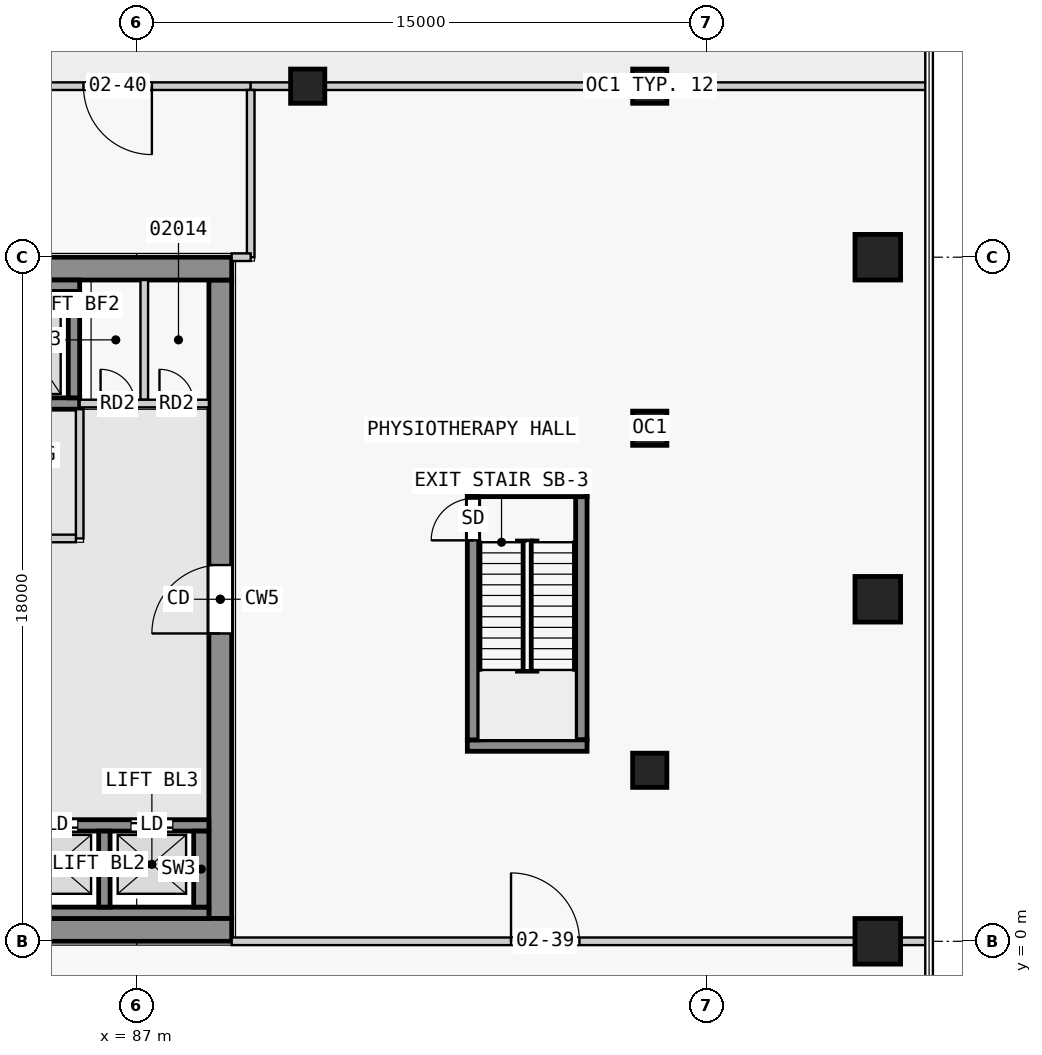
"""IFC4 building model, lengths in metres.
Left out: names, types, materials, properties, quantities, classifications, styles, units other than length and angle.
Written with IfcOpenShell. Run it as: python <this file> out.ifc"""

import sys

from ifc_helpers import new_model, si_unit, direction, frame, frame_2d, origin, origin_2d, place, context, subcontext, project, spatial, rectangle, extrude, element, fill, save


model = new_model("IFC4")
c1 = context("Model", 3, precision=1e-05, world=origin(), true_north=direction((0.0, 1.0)))
c2 = subcontext(c1, "Body", "Model", "MODEL_VIEW")
j1 = project(units=[si_unit("LENGTHUNIT", "METRE"), si_unit("PLANEANGLEUNIT", "RADIAN")], contexts=[c1])
p1 = place(None, origin())
s1 = spatial("IfcSite", under=j1, at=p1, CompositionType="ELEMENT")
p2 = place(p1, origin())
s2 = spatial("IfcBuilding", under=s1, at=p2, CompositionType="ELEMENT")
p3 = place(p2, frame((0.0, 0.0, 12.8)))
s3 = spatial("IfcBuildingStorey", under=s2, at=p3, CompositionType="ELEMENT", Elevation=12.8)
for number, where, z_axis, x_axis in (
    (1, (106.5, 0.0, 0.0), (0.0, 0.0, 1.0), (1.0, 0.0, 0.0)),
    (2, (106.5, 9.0, 0.0), (0.0, 0.0, 1.0), (1.0, 0.0, 0.0)),
    (3, (106.5, 18.0, 0.0), (0.0, 0.0, 1.0), (1.0, 0.0, 0.0)),
):
    element("IfcColumn", number, at=place(p3, frame(where, z_axis=z_axis, x_axis=x_axis)), inside=s3, PredefinedType="COLUMN", context=c2, shape_type="SweptSolid", body=[
        extrude(rectangle(XDim=1.2, YDim=1.2, at=origin_2d()), origin(), (0.0, 0.0, 1.0), 4.5),
    ])
for number, where, z_axis, x_axis in (
    (4, (100.5, 4.5, 0.0), (0.0, 0.0, 1.0), (1.0, 0.0, 0.0)),
    (5, (100.5, 13.5, 0.0), (0.0, 0.0, 1.0), (1.0, 0.0, 0.0)),
    (6, (100.5, 22.5, 0.0), (0.0, 0.0, 1.0), (1.0, 0.0, 0.0)),
    (7, (91.5, 22.5, 0.0), (0.0, 0.0, 1.0), (1.0, 0.0, 0.0)),
):
    element("IfcColumn", number, at=place(p3, frame(where, z_axis=z_axis, x_axis=x_axis)), inside=s3, PredefinedType="COLUMN", context=c2, shape_type="SweptSolid", body=[
        extrude(rectangle(XDim=0.9, YDim=0.9, at=origin_2d()), origin(), (0.0, 0.0, 1.0), 4.5),
    ])
for number, where, z_axis, x_axis in (
    (8, (75.0, 0.3, 0.0), (0.0, 0.0, 1.0), (1.0, 0.0, 0.0)),
    (9, (75.0, 17.7, 0.0), (0.0, 0.0, 1.0), (1.0, 0.0, 0.0)),
):
    element("IfcWall", number, at=place(p3, frame(where, z_axis=z_axis, x_axis=x_axis)), inside=s3, PredefinedType="SHEAR", context=c2, shape_type="SweptSolid", body=[
        extrude(rectangle(XDim=14.5, YDim=0.6, at=frame_2d((7.25, 0.0))), origin(), (0.0, 0.0, 1.0), 4.15),
    ])
p4 = place(p3, frame((89.2, 0.6, 0.0), z_axis=(0.0, 0.0, 1.0), x_axis=(0.0, 1.0, 0.0)))
e10 = element("IfcWall", 10, at=p4, inside=s3, PredefinedType="SHEAR", context=c2, shape_type="SweptSolid", body=[
    extrude(rectangle(XDim=16.8, YDim=0.6, at=frame_2d((8.4, 0.0))), origin(), (0.0, 0.0, 1.0), 4.15),
])
p5 = place(p4, frame((7.5, 0.0, 0.0)))
e11 = element("IfcOpeningElement", 11, at=p5, cuts=e10, PredefinedType="OPENING", context=c2, shape_type="SweptSolid", body=[
    extrude(rectangle(XDim=1.8, YDim=2.1, at=frame_2d((0.9, 1.05))), frame((0.0, 0.31, 0.0), z_axis=(0.0, -1.0, 0.0), x_axis=(1.0, 0.0, 0.0)), (0.0, 0.0, 1.0), 0.62),
])
p6 = place(p3, frame((81.3, 0.75, 0.0), z_axis=(0.0, 0.0, 1.0), x_axis=(1.0, 0.0, 0.0)))
e12 = element("IfcWall", 12, at=p6, inside=s3, PredefinedType="SHEAR", context=c2, shape_type="SweptSolid", body=[
    extrude(rectangle(XDim=7.6, YDim=0.3, at=frame_2d((3.8, 0.0))), origin(), (0.0, 0.0, 1.0), 4.15),
])
p7 = place(p3, frame((86.15, 0.9, 0.0), z_axis=(0.0, 0.0, 1.0), x_axis=(0.0, 1.0, 0.0)))
e13 = element("IfcWall", 13, at=p7, inside=s3, PredefinedType="SHEAR", context=c2, shape_type="SweptSolid", body=[
    extrude(rectangle(XDim=2.0, YDim=0.3, at=frame_2d((1.0, 0.0))), origin(), (0.0, 0.0, 1.0), 4.15),
])
p8 = place(p3, frame((88.7, 0.9, 0.0), z_axis=(0.0, 0.0, 1.0), x_axis=(0.0, 1.0, 0.0)))
e14 = element("IfcWall", 14, at=p8, inside=s3, PredefinedType="SHEAR", context=c2, shape_type="SweptSolid", body=[
    extrude(rectangle(XDim=2.0, YDim=0.4, at=frame_2d((1.0, 0.0))), origin(), (0.0, 0.0, 1.0), 4.15),
])
p9 = place(p3, frame((81.3, 3.05, 0.0), z_axis=(0.0, 0.0, 1.0), x_axis=(1.0, 0.0, 0.0)))
e15 = element("IfcWall", 15, at=p9, inside=s3, PredefinedType="SHEAR", context=c2, shape_type="SweptSolid", body=[
    extrude(rectangle(XDim=7.6, YDim=0.3, at=frame_2d((3.8, 0.0))), origin(), (0.0, 0.0, 1.0), 4.15),
])
p10 = place(p9, frame((0.55, 0.0, 0.0)))
e16 = element("IfcOpeningElement", 16, at=p10, cuts=e15, PredefinedType="OPENING", context=c2, shape_type="SweptSolid", body=[
    extrude(rectangle(XDim=1.1, YDim=2.1, at=frame_2d((0.55, 1.05))), frame((0.0, 0.16, 0.0), z_axis=(0.0, -1.0, 0.0), x_axis=(1.0, 0.0, 0.0)), (0.0, 0.0, 1.0), 0.32),
])
p11 = place(p9, frame((3.05, 0.0, 0.0)))
e17 = element("IfcOpeningElement", 17, at=p11, cuts=e15, PredefinedType="OPENING", context=c2, shape_type="SweptSolid", body=[
    extrude(rectangle(XDim=1.1, YDim=2.1, at=frame_2d((0.55, 1.05))), frame((0.0, 0.16, 0.0), z_axis=(0.0, -1.0, 0.0), x_axis=(1.0, 0.0, 0.0)), (0.0, 0.0, 1.0), 0.32),
])
p12 = place(p9, frame((5.55, 0.0, 0.0)))
e18 = element("IfcOpeningElement", 18, at=p12, cuts=e15, PredefinedType="OPENING", context=c2, shape_type="SweptSolid", body=[
    extrude(rectangle(XDim=1.1, YDim=2.1, at=frame_2d((0.55, 1.05))), frame((0.0, 0.16, 0.0), z_axis=(0.0, -1.0, 0.0), x_axis=(1.0, 0.0, 0.0)), (0.0, 0.0, 1.0), 0.32),
])
p13 = place(p3, frame((75.6, 17.25, 0.0), z_axis=(0.0, 0.0, 1.0), x_axis=(1.0, 0.0, 0.0)))
e19 = element("IfcWall", 19, at=p13, inside=s3, PredefinedType="SHEAR", context=c2, shape_type="SweptSolid", body=[
    extrude(rectangle(XDim=9.9, YDim=0.3, at=frame_2d((4.95, 0.0))), origin(), (0.0, 0.0, 1.0), 4.15),
])
p14 = place(p3, frame((75.6, 14.15, 0.0), z_axis=(0.0, 0.0, 1.0), x_axis=(1.0, 0.0, 0.0)))
e20 = element("IfcWall", 20, at=p14, inside=s3, PredefinedType="SHEAR", context=c2, shape_type="SweptSolid", body=[
    extrude(rectangle(XDim=9.9, YDim=0.3, at=frame_2d((4.95, 0.0))), origin(), (0.0, 0.0, 1.0), 4.15),
])
p15 = place(p14, frame((0.85, 0.0, 0.0)))
e21 = element("IfcOpeningElement", 21, at=p15, cuts=e20, PredefinedType="OPENING", context=c2, shape_type="SweptSolid", body=[
    extrude(rectangle(XDim=1.1, YDim=2.1, at=frame_2d((0.55, 1.05))), frame((0.0, 0.16, 0.0), z_axis=(0.0, -1.0, 0.0), x_axis=(1.0, 0.0, 0.0)), (0.0, 0.0, 1.0), 0.32),
])
p16 = place(p14, frame((3.35, 0.0, 0.0)))
e22 = element("IfcOpeningElement", 22, at=p16, cuts=e20, PredefinedType="OPENING", context=c2, shape_type="SweptSolid", body=[
    extrude(rectangle(XDim=1.1, YDim=2.1, at=frame_2d((0.55, 1.05))), frame((0.0, 0.16, 0.0), z_axis=(0.0, -1.0, 0.0), x_axis=(1.0, 0.0, 0.0)), (0.0, 0.0, 1.0), 0.32),
])
p17 = place(p14, frame((5.75, 0.0, 0.0)))
e23 = element("IfcOpeningElement", 23, at=p17, cuts=e20, PredefinedType="OPENING", context=c2, shape_type="SweptSolid", body=[
    extrude(rectangle(XDim=1.1, YDim=2.1, at=frame_2d((0.55, 1.05))), frame((0.0, 0.16, 0.0), z_axis=(0.0, -1.0, 0.0), x_axis=(1.0, 0.0, 0.0)), (0.0, 0.0, 1.0), 0.32),
])
p18 = place(p14, frame((8.05, 0.0, 0.0)))
e24 = element("IfcOpeningElement", 24, at=p18, cuts=e20, PredefinedType="OPENING", context=c2, shape_type="SweptSolid", body=[
    extrude(rectangle(XDim=1.1, YDim=2.1, at=frame_2d((0.55, 1.05))), frame((0.0, 0.16, 0.0), z_axis=(0.0, -1.0, 0.0), x_axis=(1.0, 0.0, 0.0)), (0.0, 0.0, 1.0), 0.32),
])
p19 = place(p3, frame((85.35, 14.3, 0.0), z_axis=(0.0, 0.0, 1.0), x_axis=(0.0, 1.0, 0.0)))
e25 = element("IfcWall", 25, at=p19, inside=s3, PredefinedType="SHEAR", context=c2, shape_type="SweptSolid", body=[
    extrude(rectangle(XDim=2.8, YDim=0.3, at=frame_2d((1.4, 0.0))), origin(), (0.0, 0.0, 1.0), 4.15),
])
p20 = place(p3, frame((95.85, 5.3, 0.0), z_axis=(0.0, 0.0, 1.0), x_axis=(0.0, 1.0, 0.0)))
e26 = element("IfcWall", 26, at=p20, inside=s3, PredefinedType="SHEAR", context=c2, shape_type="SweptSolid", body=[
    extrude(rectangle(XDim=6.4, YDim=0.3, at=frame_2d((3.2, 0.0))), origin(), (0.0, 0.0, 1.0), 4.15),
])
p21 = place(p20, frame((5.25, 0.0, 0.0)))
e27 = element("IfcOpeningElement", 27, at=p21, cuts=e26, PredefinedType="OPENING", context=c2, shape_type="SweptSolid", body=[
    extrude(rectangle(XDim=1.1, YDim=2.1, at=frame_2d((0.55, 1.05))), frame((0.0, 0.16, 0.0), z_axis=(0.0, -1.0, 0.0), x_axis=(1.0, 0.0, 0.0)), (0.0, 0.0, 1.0), 0.32),
])
p22 = place(p3, frame((98.7, 5.3, 0.0), z_axis=(0.0, 0.0, 1.0), x_axis=(0.0, 1.0, 0.0)))
e28 = element("IfcWall", 28, at=p22, inside=s3, PredefinedType="SHEAR", context=c2, shape_type="SweptSolid", body=[
    extrude(rectangle(XDim=6.4, YDim=0.3, at=frame_2d((3.2, 0.0))), origin(), (0.0, 0.0, 1.0), 4.15),
])
for number, where, z_axis, x_axis in (
    (29, (95.7, 5.15, 0.0), (0.0, 0.0, 1.0), (1.0, 0.0, 0.0)),
    (30, (95.7, 11.85, 0.0), (0.0, 0.0, 1.0), (1.0, 0.0, 0.0)),
):
    element("IfcWall", number, at=place(p3, frame(where, z_axis=z_axis, x_axis=x_axis)), inside=s3, PredefinedType="SHEAR", context=c2, shape_type="SweptSolid", body=[
        extrude(rectangle(XDim=3.15, YDim=0.3, at=frame_2d((1.575, 0.0))), origin(), (0.0, 0.0, 1.0), 4.15),
    ])
p23 = place(p3, frame((80.7, 10.6, 0.0), z_axis=(0.0, 0.0, 1.0), x_axis=(1.0, 0.0, 0.0)))
e31 = element("IfcWall", 31, at=p23, inside=s3, PredefinedType="PARTITIONING", context=c2, shape_type="SweptSolid", body=[
    extrude(rectangle(XDim=4.7, YDim=0.2, at=frame_2d((2.35, 0.0))), origin(), (0.0, 0.0, 1.0), 4.15),
])
p24 = place(p23, frame((1.75, 0.0, 0.0)))
e32 = element("IfcOpeningElement", 32, at=p24, cuts=e31, PredefinedType="OPENING", context=c2, shape_type="SweptSolid", body=[
    extrude(rectangle(XDim=1.1, YDim=2.1, at=frame_2d((0.55, 1.05))), frame((0.0, 0.11, 0.0), z_axis=(0.0, -1.0, 0.0), x_axis=(1.0, 0.0, 0.0)), (0.0, 0.0, 1.0), 0.22),
])
p25 = place(p3, frame((85.5, 10.6, 0.0), z_axis=(0.0, 0.0, 1.0), x_axis=(0.0, 1.0, 0.0)))
e33 = element("IfcWall", 33, at=p25, inside=s3, PredefinedType="PARTITIONING", context=c2, shape_type="SweptSolid", body=[
    extrude(rectangle(XDim=3.4, YDim=0.2, at=frame_2d((1.7, 0.0))), origin(), (0.0, 0.0, 1.0), 4.15),
])
p26 = place(p3, frame((85.5, 14.15, 0.0), z_axis=(0.0, 0.0, 1.0), x_axis=(1.0, 0.0, 0.0)))
e34 = element("IfcWall", 34, at=p26, inside=s3, PredefinedType="PARTITIONING", context=c2, shape_type="SweptSolid", body=[
    extrude(rectangle(XDim=3.4, YDim=0.2, at=frame_2d((1.7, 0.0))), origin(), (0.0, 0.0, 1.0), 4.15),
])
p27 = place(p26, frame((0.55, 0.0, 0.0)))
e35 = element("IfcOpeningElement", 35, at=p27, cuts=e34, PredefinedType="OPENING", context=c2, shape_type="SweptSolid", body=[
    extrude(rectangle(XDim=0.9, YDim=2.1, at=frame_2d((0.45, 1.05))), frame((0.0, 0.11, 0.0), z_axis=(0.0, -1.0, 0.0), x_axis=(1.0, 0.0, 0.0)), (0.0, 0.0, 1.0), 0.22),
])
p28 = place(p26, frame((2.1, 0.0, 0.0)))
e36 = element("IfcOpeningElement", 36, at=p28, cuts=e34, PredefinedType="OPENING", context=c2, shape_type="SweptSolid", body=[
    extrude(rectangle(XDim=0.9, YDim=2.1, at=frame_2d((0.45, 1.05))), frame((0.0, 0.11, 0.0), z_axis=(0.0, -1.0, 0.0), x_axis=(1.0, 0.0, 0.0)), (0.0, 0.0, 1.0), 0.22),
])
p29 = place(p3, frame((87.2, 14.25, 0.0), z_axis=(0.0, 0.0, 1.0), x_axis=(0.0, 1.0, 0.0)))
e37 = element("IfcWall", 37, at=p29, inside=s3, PredefinedType="PARTITIONING", context=c2, shape_type="SweptSolid", body=[
    extrude(rectangle(XDim=3.15, YDim=0.2, at=frame_2d((1.575, 0.0))), origin(), (0.0, 0.0, 1.0), 4.15),
])
p30 = place(p3, frame((89.5, 0.0, 0.0), z_axis=(0.0, 0.0, 1.0), x_axis=(1.0, 0.0, 0.0)))
e38 = element("IfcWall", 38, at=p30, inside=s3, PredefinedType="PARTITIONING", context=c2, shape_type="SweptSolid", body=[
    extrude(rectangle(XDim=16.4, YDim=0.2, at=frame_2d((8.2, 0.0))), origin(), (0.0, 0.0, 1.0), 4.15),
])
p31 = place(p30, frame((7.35, 0.0, 0.0)))
e39 = element("IfcOpeningElement", 39, at=p31, cuts=e38, PredefinedType="OPENING", context=c2, shape_type="SweptSolid", body=[
    extrude(rectangle(XDim=1.8, YDim=2.1, at=frame_2d((0.9, 1.05))), frame((0.0, 0.11, 0.0), z_axis=(0.0, -1.0, 0.0), x_axis=(1.0, 0.0, 0.0)), (0.0, 0.0, 1.0), 0.22),
])
p32 = place(p3, frame((107.1, 0.0, 0.0), z_axis=(0.0, 0.0, 1.0), x_axis=(1.0, 0.0, 0.0)))
e40 = element("IfcWall", 40, at=p32, inside=s3, PredefinedType="PARTITIONING", context=c2, shape_type="SweptSolid", body=[
    extrude(rectangle(XDim=0.75, YDim=0.2, at=frame_2d((0.375, 0.0))), origin(), (0.0, 0.0, 1.0), 4.15),
])
p33 = place(p3, frame((90.0, 22.5, 0.0), z_axis=(0.0, 0.0, 1.0), x_axis=(-1.0, 0.0, 0.0)))
e41 = element("IfcWall", 41, at=p33, inside=s3, PredefinedType="PARTITIONING", context=c2, shape_type="SweptSolid", body=[
    extrude(rectangle(XDim=7.05, YDim=0.2, at=frame_2d((3.525, 0.0))), origin(), (0.0, 0.0, 1.0), 4.15),
])
p34 = place(p33, frame((2.6, 0.0, 0.0)))
e42 = element("IfcOpeningElement", 42, at=p34, cuts=e41, PredefinedType="OPENING", context=c2, shape_type="SweptSolid", body=[
    extrude(rectangle(XDim=1.8, YDim=2.1, at=frame_2d((0.9, 1.05))), frame((0.0, 0.11, 0.0), z_axis=(0.0, -1.0, 0.0), x_axis=(1.0, 0.0, 0.0)), (0.0, 0.0, 1.0), 0.22),
])
p35 = place(p3, frame((107.85, 22.5, 0.0), z_axis=(0.0, 0.0, 1.0), x_axis=(-1.0, 0.0, 0.0)))
e43 = element("IfcWall", 43, at=p35, inside=s3, PredefinedType="PARTITIONING", context=c2, shape_type="SweptSolid", body=[
    extrude(rectangle(XDim=6.9, YDim=0.2, at=frame_2d((3.45, 0.0))), origin(), (0.0, 0.0, 1.0), 3.45),
])
p36 = place(p3, frame((100.05, 22.5, 0.0), z_axis=(0.0, 0.0, 1.0), x_axis=(-1.0, 0.0, 0.0)))
e44 = element("IfcWall", 44, at=p36, inside=s3, PredefinedType="PARTITIONING", context=c2, shape_type="SweptSolid", body=[
    extrude(rectangle(XDim=8.1, YDim=0.2, at=frame_2d((4.05, 0.0))), origin(), (0.0, 0.0, 1.0), 4.15),
])
p37 = place(p3, frame((91.05, 22.5, 0.0), z_axis=(0.0, 0.0, 1.0), x_axis=(-1.0, 0.0, 0.0)))
e45 = element("IfcWall", 45, at=p37, inside=s3, PredefinedType="PARTITIONING", context=c2, shape_type="SweptSolid", body=[
    extrude(rectangle(XDim=1.05, YDim=0.2, at=frame_2d((0.525, 0.0))), origin(), (0.0, 0.0, 1.0), 4.15),
])
p38 = place(p3, frame((90.0, 22.4, 0.0), z_axis=(0.0, 0.0, 1.0), x_axis=(0.0, -1.0, 0.0)))
e46 = element("IfcWall", 46, at=p38, inside=s3, PredefinedType="PARTITIONING", context=c2, shape_type="SweptSolid", body=[
    extrude(rectangle(XDim=4.4, YDim=0.2, at=frame_2d((2.2, 0.0))), origin(), (0.0, 0.0, 1.0), 4.15),
])
p39 = place(p3, frame((90.0, 18.0, 0.0), z_axis=(0.0, 0.0, 1.0), x_axis=(-1.0, 0.0, 0.0)))
e47 = element("IfcWall", 47, at=p39, inside=s3, PredefinedType="PARTITIONING", context=c2, shape_type="SweptSolid", body=[
    extrude(rectangle(XDim=0.5, YDim=0.2, at=frame_2d((0.25, 0.0))), origin(), (0.0, 0.0, 1.0), 4.15),
])
p40 = place(p11, origin())
e48 = element("IfcDoor", 48, at=p40, inside=s3, OperationType="DOUBLE_DOOR_SLIDING", PredefinedType="DOOR", context=c2, shape_type="SweptSolid", body=[
    extrude(rectangle(XDim=1.1, YDim=2.1, at=frame_2d((0.55, 1.05))), frame((0.0, 0.025, 0.0), z_axis=(0.0, -1.0, 0.0), x_axis=(1.0, 0.0, 0.0)), (0.0, 0.0, 1.0), 0.05),
])
fill(e17, e48)
p41 = place(p12, origin())
e49 = element("IfcDoor", 49, at=p41, inside=s3, OperationType="DOUBLE_DOOR_SLIDING", PredefinedType="DOOR", context=c2, shape_type="SweptSolid", body=[
    extrude(rectangle(XDim=1.1, YDim=2.1, at=frame_2d((0.55, 1.05))), frame((0.0, 0.025, 0.0), z_axis=(0.0, -1.0, 0.0), x_axis=(1.0, 0.0, 0.0)), (0.0, 0.0, 1.0), 0.05),
])
fill(e18, e49)
p42 = place(p21, origin())
e50 = element("IfcDoor", 50, at=p42, inside=s3, OperationType="SINGLE_SWING_LEFT", PredefinedType="DOOR", context=c2, shape_type="SweptSolid", body=[
    extrude(rectangle(XDim=1.1, YDim=2.1, at=frame_2d((0.55, 1.05))), frame((0.0, 0.025, 0.0), z_axis=(0.0, -1.0, 0.0), x_axis=(1.0, 0.0, 0.0)), (0.0, 0.0, 1.0), 0.05),
])
fill(e27, e50)
p43 = place(p5, origin())
e51 = element("IfcDoor", 51, at=p43, inside=s3, OperationType="DOUBLE_DOOR_SINGLE_SWING", PredefinedType="DOOR", context=c2, shape_type="SweptSolid", body=[
    extrude(rectangle(XDim=1.8, YDim=2.1, at=frame_2d((0.9, 1.05))), frame((0.0, 0.025, 0.0), z_axis=(0.0, -1.0, 0.0), x_axis=(1.0, 0.0, 0.0)), (0.0, 0.0, 1.0), 0.05),
])
fill(e11, e51)
p44 = place(p27, origin())
e52 = element("IfcDoor", 52, at=p44, inside=s3, OperationType="SINGLE_SWING_LEFT", PredefinedType="DOOR", context=c2, shape_type="SweptSolid", body=[
    extrude(rectangle(XDim=0.9, YDim=2.1, at=frame_2d((0.45, 1.05))), frame((0.0, 0.025, 0.0), z_axis=(0.0, -1.0, 0.0), x_axis=(1.0, 0.0, 0.0)), (0.0, 0.0, 1.0), 0.05),
])
fill(e35, e52)
p45 = place(p28, origin())
e53 = element("IfcDoor", 53, at=p45, inside=s3, OperationType="SINGLE_SWING_LEFT", PredefinedType="DOOR", context=c2, shape_type="SweptSolid", body=[
    extrude(rectangle(XDim=0.9, YDim=2.1, at=frame_2d((0.45, 1.05))), frame((0.0, 0.025, 0.0), z_axis=(0.0, -1.0, 0.0), x_axis=(1.0, 0.0, 0.0)), (0.0, 0.0, 1.0), 0.05),
])
fill(e36, e53)
p46 = place(p31, origin())
e54 = element("IfcDoor", 54, at=p46, inside=s3, OperationType="DOUBLE_DOOR_SINGLE_SWING", PredefinedType="DOOR", context=c2, shape_type="SweptSolid", body=[
    extrude(rectangle(XDim=1.8, YDim=2.1, at=frame_2d((0.9, 1.05))), frame((0.0, 0.025, 0.0), z_axis=(0.0, -1.0, 0.0), x_axis=(1.0, 0.0, 0.0)), (0.0, 0.0, 1.0), 0.05),
])
fill(e39, e54)
p47 = place(p34, origin())
e55 = element("IfcDoor", 55, at=p47, inside=s3, OperationType="DOUBLE_DOOR_SINGLE_SWING", PredefinedType="DOOR", context=c2, shape_type="SweptSolid", body=[
    extrude(rectangle(XDim=1.8, YDim=2.1, at=frame_2d((0.9, 1.05))), frame((0.0, 0.025, 0.0), z_axis=(0.0, -1.0, 0.0), x_axis=(1.0, 0.0, 0.0)), (0.0, 0.0, 1.0), 0.05),
])
fill(e42, e55)
save(model, sys.argv[1])
